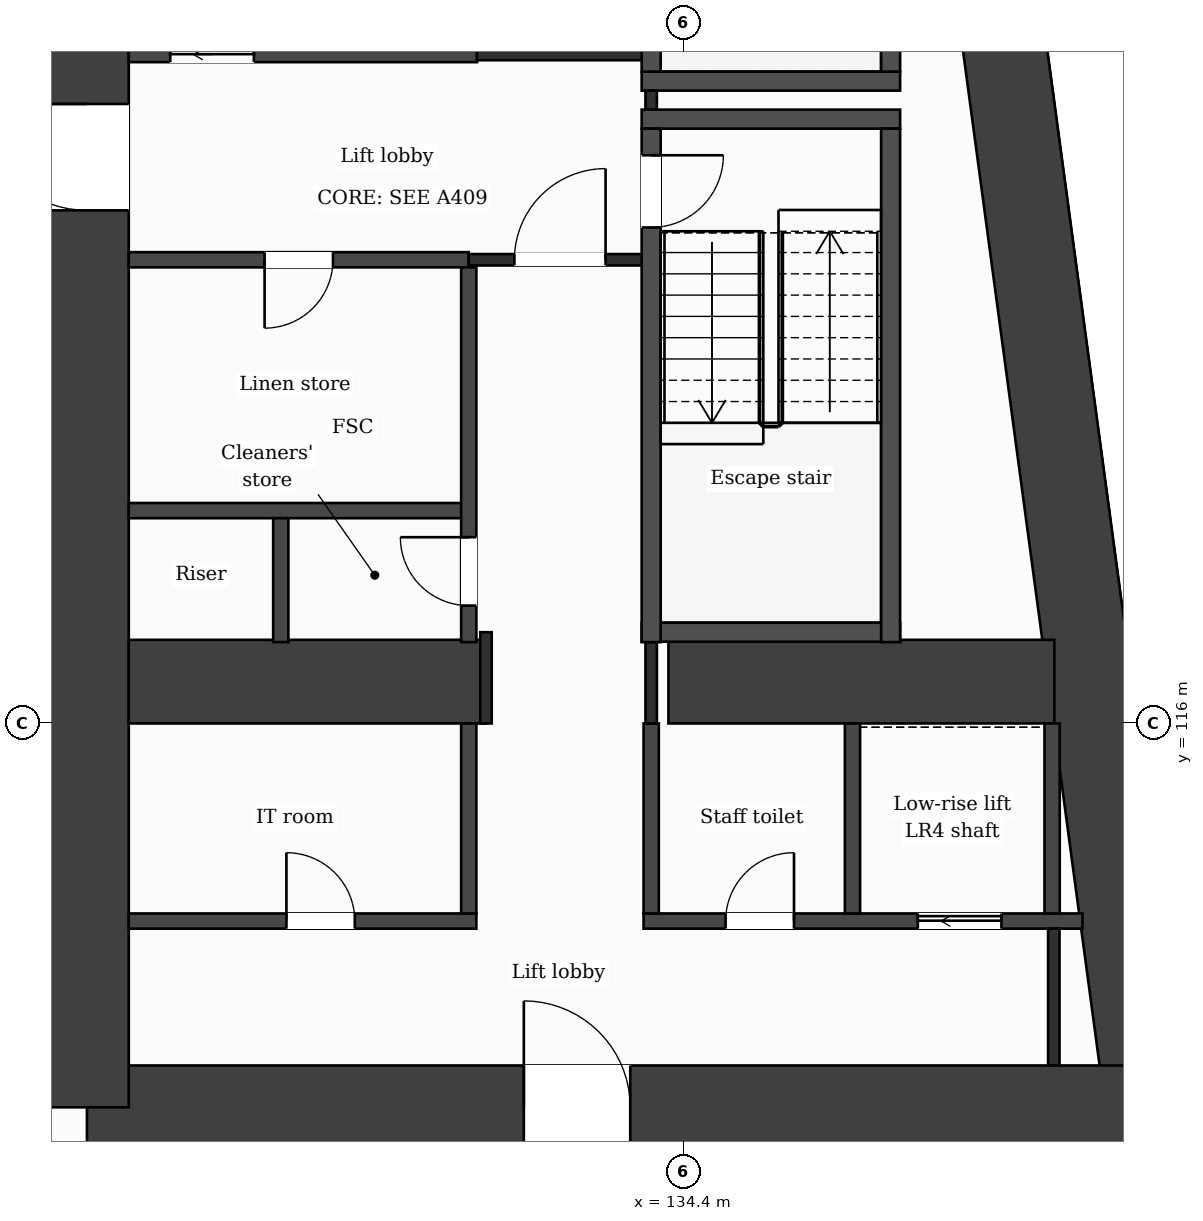
"""IFC4 building model, lengths in metres.
Left out: names, types, materials, properties, quantities, classifications, styles, units other than length and angle.
Written with IfcOpenShell. Run it as: python <this file> out.ifc"""

import sys

from ifc_helpers import new_model, si_unit, direction, frame, frame_2d, origin, place, context, subcontext, project, spatial, rectangle, extrude, element, fill, save


model = new_model("IFC4")
c1 = context("Model", 3, precision=1e-05, world=origin(), true_north=direction((0.0, 1.0)))
c2 = subcontext(c1, "Body", "Model", "MODEL_VIEW")
j1 = project(units=[si_unit("LENGTHUNIT", "METRE"), si_unit("PLANEANGLEUNIT", "RADIAN")], contexts=[c1])
p1 = place(None, origin())
s1 = spatial("IfcSite", under=j1, at=p1, CompositionType="ELEMENT")
p2 = place(p1, origin())
s2 = spatial("IfcBuilding", under=s1, at=p2, CompositionType="ELEMENT")
p3 = place(p2, frame((0.0, 0.0, 46.0)))
s3 = spatial("IfcBuildingStorey", under=s2, at=p3, CompositionType="ELEMENT", Elevation=46.0)
p4 = place(p3, frame((137.688, 131.85, 0.0), z_axis=(0.0, 0.0, 1.0), x_axis=(0.133411793472, -0.991060691059, 0.0)))
e1 = element("IfcWall", 1, at=p4, inside=s3, PredefinedType="SHEAR", context=c2, shape_type="SweptSolid", body=[
    extrude(rectangle(XDim=21.089, YDim=1.1, at=frame_2d((10.544, 0.0))), origin(), (0.0, 0.0, 1.0), 3.5),
])
p5 = place(p3, frame((140.502, 110.95, 0.0), z_axis=(0.0, 0.0, 1.0), x_axis=(-1.0, 0.0, 0.0)))
e2 = element("IfcWall", 2, at=p5, inside=s3, PredefinedType="SHEAR", context=c2, shape_type="SweptSolid", body=[
    extrude(rectangle(XDim=13.952, YDim=1.1, at=frame_2d((6.976, 0.0))), origin(), (0.0, 0.0, 1.0), 3.5),
])
p6 = place(p5, frame((6.804, 0.0, 0.0)))
e3 = element("IfcOpeningElement", 3, at=p6, cuts=e2, PredefinedType="OPENING", context=c2, shape_type="SweptSolid", body=[
    extrude(rectangle(XDim=1.4, YDim=2.1, at=frame_2d((0.7, 1.05))), frame((0.0, 0.56, 0.0), z_axis=(0.0, -1.0, 0.0), x_axis=(1.0, 0.0, 0.0)), (0.0, 0.0, 1.0), 1.12),
])
p7 = place(p3, frame((126.55, 110.95, 0.0), z_axis=(0.0, 0.0, 1.0), x_axis=(0.0, 1.0, 0.0)))
e4 = element("IfcWall", 4, at=p7, inside=s3, PredefinedType="SHEAR", context=c2, shape_type="SweptSolid", body=[
    extrude(rectangle(XDim=20.9, YDim=1.1, at=frame_2d((10.45, 0.0))), origin(), (0.0, 0.0, 1.0), 3.5),
])
p8 = place(p7, frame((11.8, 0.0, 0.0)))
e5 = element("IfcOpeningElement", 5, at=p8, cuts=e4, PredefinedType="OPENING", context=c2, shape_type="SweptSolid", body=[
    extrude(rectangle(XDim=1.4, YDim=2.1, at=frame_2d((0.7, 1.05))), frame((0.0, 0.56, 0.0), z_axis=(0.0, -1.0, 0.0), x_axis=(1.0, 0.0, 0.0)), (0.0, 0.0, 1.0), 1.12),
])
p9 = place(p3, frame((127.1, 116.55, 0.0), z_axis=(0.0, 0.0, 1.0), x_axis=(1.0, 0.0, 0.0)))
e6 = element("IfcWall", 6, at=p9, inside=s3, PredefinedType="SHEAR", context=c2, shape_type="SweptSolid", body=[
    extrude(rectangle(XDim=4.7, YDim=1.1, at=frame_2d((2.35, 0.0))), origin(), (0.0, 0.0, 1.0), 3.5),
])
p10 = place(p3, frame((134.2, 116.55, 0.0), z_axis=(0.0, 0.0, 1.0), x_axis=(1.0, 0.0, 0.0)))
e7 = element("IfcWall", 7, at=p10, inside=s3, PredefinedType="SHEAR", context=c2, shape_type="SweptSolid", body=[
    extrude(rectangle(XDim=5.077, YDim=1.1, at=frame_2d((2.539, 0.0))), origin(), (0.0, 0.0, 1.0), 3.5),
])
p11 = place(p3, frame((127.1, 113.4, 0.0), z_axis=(0.0, 0.0, 1.0), x_axis=(1.0, 0.0, 0.0)))
e8 = element("IfcWall", 8, at=p11, inside=s3, PredefinedType="PARTITIONING", context=c2, shape_type="SweptSolid", body=[
    extrude(rectangle(XDim=4.573, YDim=0.2, at=frame_2d((2.287, 0.0))), origin(), (0.0, 0.0, 1.0), 3.18),
])
p12 = place(p11, frame((2.074, 0.0, 0.0)))
e9 = element("IfcOpeningElement", 9, at=p12, cuts=e8, PredefinedType="OPENING", context=c2, shape_type="SweptSolid", body=[
    extrude(rectangle(XDim=0.9, YDim=2.1, at=frame_2d((0.45, 1.05))), frame((0.0, 0.11, 0.0), z_axis=(0.0, -1.0, 0.0), x_axis=(1.0, 0.0, 0.0)), (0.0, 0.0, 1.0), 0.22),
])
p13 = place(p3, frame((133.873, 113.4, 0.0), z_axis=(0.0, 0.0, 1.0), x_axis=(1.0, 0.0, 0.0)))
e10 = element("IfcWall", 10, at=p13, inside=s3, PredefinedType="PARTITIONING", context=c2, shape_type="SweptSolid", body=[
    extrude(rectangle(XDim=5.774, YDim=0.2, at=frame_2d((2.887, 0.0))), origin(), (0.0, 0.0, 1.0), 3.18),
])
p14 = place(p13, frame((3.608, 0.0, 0.0)))
e11 = element("IfcOpeningElement", 11, at=p14, cuts=e10, PredefinedType="OPENING", context=c2, shape_type="SweptSolid", body=[
    extrude(rectangle(XDim=1.1, YDim=2.1, at=frame_2d((0.55, 1.05))), frame((0.0, 0.11, 0.0), z_axis=(0.0, -1.0, 0.0), x_axis=(1.0, 0.0, 0.0)), (0.0, 0.0, 1.0), 0.22),
])
p15 = place(p13, frame((1.079, 0.0, 0.0)))
e12 = element("IfcOpeningElement", 12, at=p15, cuts=e10, PredefinedType="OPENING", context=c2, shape_type="SweptSolid", body=[
    extrude(rectangle(XDim=0.9, YDim=2.1, at=frame_2d((0.45, 1.05))), frame((0.0, 0.11, 0.0), z_axis=(0.0, -1.0, 0.0), x_axis=(1.0, 0.0, 0.0)), (0.0, 0.0, 1.0), 0.22),
])
p16 = place(p3, frame((133.848, 117.2, 0.0), z_axis=(0.0, 0.0, 1.0), x_axis=(1.0, 0.0, 0.0)))
e13 = element("IfcWall", 13, at=p16, inside=s3, PredefinedType="PARTITIONING", context=c2, shape_type="SweptSolid", body=[
    extrude(rectangle(XDim=3.4, YDim=0.25, at=frame_2d((1.7, 0.0))), origin(), (0.0, 0.0, 1.0), 3.18),
])
p17 = place(p3, frame((127.1, 118.8, 0.0), z_axis=(0.0, 0.0, 1.0), x_axis=(1.0, 0.0, 0.0)))
e14 = element("IfcWall", 14, at=p17, inside=s3, PredefinedType="PARTITIONING", context=c2, shape_type="SweptSolid", body=[
    extrude(rectangle(XDim=4.473, YDim=0.2, at=frame_2d((2.236, 0.0))), origin(), (0.0, 0.0, 1.0), 3.18),
])
p18 = place(p3, frame((127.1, 122.1, 0.0), z_axis=(0.0, 0.0, 1.0), x_axis=(1.0, 0.0, 0.0)))
e15 = element("IfcWall", 15, at=p18, inside=s3, PredefinedType="PARTITIONING", context=c2, shape_type="SweptSolid", body=[
    extrude(rectangle(XDim=4.473, YDim=0.2, at=frame_2d((2.236, 0.0))), origin(), (0.0, 0.0, 1.0), 3.18),
])
p19 = place(p18, frame((1.787, 0.0, 0.0)))
e16 = element("IfcOpeningElement", 16, at=p19, cuts=e15, PredefinedType="OPENING", context=c2, shape_type="SweptSolid", body=[
    extrude(rectangle(XDim=0.9, YDim=2.1, at=frame_2d((0.45, 1.05))), frame((0.0, 0.11, 0.0), z_axis=(0.0, -1.0, 0.0), x_axis=(1.0, 0.0, 0.0)), (0.0, 0.0, 1.0), 0.22),
])
p20 = place(p3, frame((131.573, 122.1, 0.0), z_axis=(0.0, 0.0, 1.0), x_axis=(1.0, 0.0, 0.0)))
e17 = element("IfcWall", 17, at=p20, inside=s3, PredefinedType="PARTITIONING", context=c2, shape_type="SweptSolid", body=[
    extrude(rectangle(XDim=2.4, YDim=0.15, at=frame_2d((1.2, 0.0))), origin(), (0.0, 0.0, 1.0), 3.18),
])
p21 = place(p20, frame((0.6, 0.0, 0.0)))
e18 = element("IfcOpeningElement", 18, at=p21, cuts=e17, PredefinedType="OPENING", context=c2, shape_type="SweptSolid", body=[
    extrude(rectangle(XDim=1.2, YDim=2.1, at=frame_2d((0.6, 1.05))), frame((0.0, 0.085, 0.0), z_axis=(0.0, -1.0, 0.0), x_axis=(1.0, 0.0, 0.0)), (0.0, 0.0, 1.0), 0.17),
])
for number, where, z_axis, x_axis in (
    (19, (133.848, 123.95, 0.0), (0.0, 0.0, 1.0), (1.0, 0.0, 0.0)),
    (20, (133.848, 124.45, 0.0), (0.0, 0.0, 1.0), (1.0, 0.0, 0.0)),
):
    element("IfcWall", number, at=place(p3, frame(where, z_axis=z_axis, x_axis=x_axis)), inside=s3, PredefinedType="PARTITIONING", context=c2, shape_type="SweptSolid", body=[
        extrude(rectangle(XDim=3.4, YDim=0.25, at=frame_2d((1.7, 0.0))), origin(), (0.0, 0.0, 1.0), 3.18),
    ])
p22 = place(p3, frame((127.1, 124.8, 0.0), z_axis=(0.0, 0.0, 1.0), x_axis=(1.0, 0.0, 0.0)))
e21 = element("IfcWall", 21, at=p22, inside=s3, PredefinedType="PARTITIONING", context=c2, shape_type="SweptSolid", body=[
    extrude(rectangle(XDim=4.582, YDim=0.2, at=frame_2d((2.291, 0.0))), origin(), (0.0, 0.0, 1.0), 3.18),
])
p23 = place(p22, frame((0.546, 0.0, 0.0)))
e22 = element("IfcOpeningElement", 22, at=p23, cuts=e21, PredefinedType="OPENING", context=c2, shape_type="SweptSolid", body=[
    extrude(rectangle(XDim=1.1, YDim=2.1, at=frame_2d((0.55, 1.05))), frame((0.0, 0.11, 0.0), z_axis=(0.0, -1.0, 0.0), x_axis=(1.0, 0.0, 0.0)), (0.0, 0.0, 1.0), 0.22),
])
p24 = place(p3, frame((131.682, 124.8, 0.0), z_axis=(0.0, 0.0, 1.0), x_axis=(1.0, 0.0, 0.0)))
e23 = element("IfcWall", 23, at=p24, inside=s3, PredefinedType="PARTITIONING", context=c2, shape_type="SweptSolid", body=[
    extrude(rectangle(XDim=2.416, YDim=0.15, at=frame_2d((1.208, 0.0))), origin(), (0.0, 0.0, 1.0), 3.18),
])
p25 = place(p3, frame((129.1, 117.07, 0.0), z_axis=(0.0, 0.0, 1.0), x_axis=(0.0, 1.0, 0.0)))
e24 = element("IfcWall", 24, at=p25, inside=s3, PredefinedType="PARTITIONING", context=c2, shape_type="SweptSolid", body=[
    extrude(rectangle(XDim=1.63, YDim=0.2, at=frame_2d((0.815, 0.0))), origin(), (0.0, 0.0, 1.0), 3.18),
])
p26 = place(p3, frame((131.573, 113.5, 0.0), z_axis=(0.0, 0.0, 1.0), x_axis=(0.0, 1.0, 0.0)))
e25 = element("IfcWall", 25, at=p26, inside=s3, PredefinedType="PARTITIONING", context=c2, shape_type="SweptSolid", body=[
    extrude(rectangle(XDim=2.5, YDim=0.2, at=frame_2d((1.25, 0.0))), origin(), (0.0, 0.0, 1.0), 3.18),
])
p27 = place(p3, frame((131.573, 117.07, 0.0), z_axis=(0.0, 0.0, 1.0), x_axis=(0.0, 1.0, 0.0)))
e26 = element("IfcWall", 26, at=p27, inside=s3, PredefinedType="PARTITIONING", context=c2, shape_type="SweptSolid", body=[
    extrude(rectangle(XDim=4.93, YDim=0.2, at=frame_2d((2.465, 0.0))), origin(), (0.0, 0.0, 1.0), 3.18),
])
p28 = place(p27, frame((0.48, 0.0, 0.0)))
e27 = element("IfcOpeningElement", 27, at=p28, cuts=e26, PredefinedType="OPENING", context=c2, shape_type="SweptSolid", body=[
    extrude(rectangle(XDim=0.9, YDim=2.1, at=frame_2d((0.45, 1.05))), frame((0.0, 0.11, 0.0), z_axis=(0.0, -1.0, 0.0), x_axis=(1.0, 0.0, 0.0)), (0.0, 0.0, 1.0), 0.22),
])
p29 = place(p3, frame((131.8, 116.0, 0.0), z_axis=(0.0, 0.0, 1.0), x_axis=(0.0, 1.0, 0.0)))
e28 = element("IfcWall", 28, at=p29, inside=s3, PredefinedType="PARTITIONING", context=c2, shape_type="SweptSolid", body=[
    extrude(rectangle(XDim=1.2, YDim=0.15, at=frame_2d((0.6, 0.0))), origin(), (0.0, 0.0, 1.0), 3.18),
])
p30 = place(p3, frame((133.973, 113.5, 0.0), z_axis=(0.0, 0.0, 1.0), x_axis=(0.0, 1.0, 0.0)))
e29 = element("IfcWall", 29, at=p30, inside=s3, PredefinedType="PARTITIONING", context=c2, shape_type="SweptSolid", body=[
    extrude(rectangle(XDim=2.5, YDim=0.2, at=frame_2d((1.25, 0.0))), origin(), (0.0, 0.0, 1.0), 3.18),
])
p31 = place(p3, frame((133.973, 116.0, 0.0), z_axis=(0.0, 0.0, 1.0), x_axis=(0.0, 1.0, 0.0)))
e30 = element("IfcWall", 30, at=p31, inside=s3, PredefinedType="PARTITIONING", context=c2, shape_type="SweptSolid", body=[
    extrude(rectangle(XDim=1.07, YDim=0.15, at=frame_2d((0.535, 0.0))), origin(), (0.0, 0.0, 1.0), 3.18),
])
p32 = place(p3, frame((133.973, 124.075, 0.0), z_axis=(0.0, 0.0, 1.0), x_axis=(0.0, 1.0, 0.0)))
e31 = element("IfcWall", 31, at=p32, inside=s3, PredefinedType="PARTITIONING", context=c2, shape_type="SweptSolid", body=[
    extrude(rectangle(XDim=0.25, YDim=0.15, at=frame_2d((0.125, 0.0))), origin(), (0.0, 0.0, 1.0), 3.18),
])
p33 = place(p3, frame((133.973, 117.07, 0.0), z_axis=(0.0, 0.0, 1.0), x_axis=(0.0, 1.0, 0.0)))
e32 = element("IfcWall", 32, at=p33, inside=s3, PredefinedType="PARTITIONING", context=c2, shape_type="SweptSolid", body=[
    extrude(rectangle(XDim=6.755, YDim=0.25, at=frame_2d((3.377, 0.0))), origin(), (0.0, 0.0, 1.0), 3.18),
])
p34 = place(p33, frame((5.455, 0.0, 0.0)))
e33 = element("IfcOpeningElement", 33, at=p34, cuts=e32, PredefinedType="OPENING", context=c2, shape_type="SweptSolid", body=[
    extrude(rectangle(XDim=0.95, YDim=2.1, at=frame_2d((0.475, 1.05))), frame((0.0, 0.135, 0.0), z_axis=(0.0, -1.0, 0.0), x_axis=(1.0, 0.0, 0.0)), (0.0, 0.0, 1.0), 0.27),
])
p35 = place(p3, frame((133.973, 124.575, 0.0), z_axis=(0.0, 0.0, 1.0), x_axis=(0.0, 1.0, 0.0)))
e34 = element("IfcWall", 34, at=p35, inside=s3, PredefinedType="PARTITIONING", context=c2, shape_type="SweptSolid", body=[
    extrude(rectangle(XDim=6.755, YDim=0.25, at=frame_2d((3.377, 0.0))), origin(), (0.0, 0.0, 1.0), 3.18),
])
p36 = place(p35, frame((5.325, 0.0, 0.0)))
e35 = element("IfcOpeningElement", 35, at=p36, cuts=e34, PredefinedType="OPENING", context=c2, shape_type="SweptSolid", body=[
    extrude(rectangle(XDim=1.0, YDim=2.1, at=frame_2d((0.5, 1.05))), frame((0.0, 0.135, 0.0), z_axis=(0.0, -1.0, 0.0), x_axis=(1.0, 0.0, 0.0)), (0.0, 0.0, 1.0), 0.27),
])
p37 = place(p3, frame((136.622, 113.5, 0.0), z_axis=(0.0, 0.0, 1.0), x_axis=(0.0, 1.0, 0.0)))
e36 = element("IfcWall", 36, at=p37, inside=s3, PredefinedType="PARTITIONING", context=c2, shape_type="SweptSolid", body=[
    extrude(rectangle(XDim=2.5, YDim=0.2, at=frame_2d((1.25, 0.0))), origin(), (0.0, 0.0, 1.0), 3.18),
])
p38 = place(p3, frame((137.123, 117.07, 0.0), z_axis=(0.0, 0.0, 1.0), x_axis=(0.0, 1.0, 0.0)))
e37 = element("IfcWall", 37, at=p38, inside=s3, PredefinedType="PARTITIONING", context=c2, shape_type="SweptSolid", body=[
    extrude(rectangle(XDim=6.755, YDim=0.25, at=frame_2d((3.377, 0.0))), origin(), (0.0, 0.0, 1.0), 3.18),
])
p39 = place(p3, frame((137.123, 124.575, 0.0), z_axis=(0.0, 0.0, 1.0), x_axis=(0.0, 1.0, 0.0)))
e38 = element("IfcWall", 38, at=p39, inside=s3, PredefinedType="PARTITIONING", context=c2, shape_type="SweptSolid", body=[
    extrude(rectangle(XDim=6.5, YDim=0.25, at=frame_2d((3.25, 0.0))), origin(), (0.0, 0.0, 1.0), 3.18),
])
p40 = place(p3, frame((139.248, 113.5, 0.0), z_axis=(0.0, 0.0, 1.0), x_axis=(0.0, 1.0, 0.0)))
e39 = element("IfcWall", 39, at=p40, inside=s3, PredefinedType="PARTITIONING", context=c2, shape_type="SweptSolid", body=[
    extrude(rectangle(XDim=2.5, YDim=0.2, at=frame_2d((1.25, 0.0))), origin(), (0.0, 0.0, 1.0), 3.18),
])
p41 = place(p3, frame((139.27, 111.5, 0.0), z_axis=(0.0, 0.0, 1.0), x_axis=(0.0, 1.0, 0.0)))
e40 = element("IfcWall", 40, at=p41, inside=s3, PredefinedType="PARTITIONING", context=c2, shape_type="SweptSolid", body=[
    extrude(rectangle(XDim=1.8, YDim=0.15, at=frame_2d((0.9, 0.0))), origin(), (0.0, 0.0, 1.0), 3.18),
])
p42 = place(p21, origin())
e41 = element("IfcDoor", 41, at=p42, inside=s3, OperationType="SINGLE_SWING_RIGHT", PredefinedType="DOOR", context=c2, shape_type="SweptSolid", body=[
    extrude(rectangle(XDim=1.2, YDim=2.1, at=frame_2d((0.6, 1.05))), frame((0.0, 0.025, 0.0), z_axis=(0.0, -1.0, 0.0), x_axis=(1.0, 0.0, 0.0)), (0.0, 0.0, 1.0), 0.05),
])
fill(e18, e41)
p43 = place(p23, origin())
e42 = element("IfcDoor", 42, at=p43, inside=s3, OperationType="SLIDING_TO_LEFT", PredefinedType="DOOR", context=c2, shape_type="SweptSolid", body=[
    extrude(rectangle(XDim=1.1, YDim=2.1, at=frame_2d((0.55, 1.05))), frame((0.0, 0.025, 0.0), z_axis=(0.0, -1.0, 0.0), x_axis=(1.0, 0.0, 0.0)), (0.0, 0.0, 1.0), 0.05),
])
fill(e22, e42)
p44 = place(p19, origin())
e43 = element("IfcDoor", 43, at=p44, inside=s3, OperationType="SINGLE_SWING_LEFT", PredefinedType="DOOR", context=c2, shape_type="SweptSolid", body=[
    extrude(rectangle(XDim=0.9, YDim=2.1, at=frame_2d((0.45, 1.05))), frame((0.0, 0.025, 0.0), z_axis=(0.0, -1.0, 0.0), x_axis=(1.0, 0.0, 0.0)), (0.0, 0.0, 1.0), 0.05),
])
fill(e16, e43)
p45 = place(p34, origin())
e44 = element("IfcDoor", 44, at=p45, inside=s3, OperationType="SINGLE_SWING_RIGHT", PredefinedType="DOOR", context=c2, shape_type="SweptSolid", body=[
    extrude(rectangle(XDim=0.95, YDim=2.1, at=frame_2d((0.475, 1.05))), frame((0.0, 0.025, 0.0), z_axis=(0.0, -1.0, 0.0), x_axis=(1.0, 0.0, 0.0)), (0.0, 0.0, 1.0), 0.05),
])
fill(e33, e44)
p46 = place(p28, origin())
e45 = element("IfcDoor", 45, at=p46, inside=s3, OperationType="SINGLE_SWING_RIGHT", PredefinedType="DOOR", context=c2, shape_type="SweptSolid", body=[
    extrude(rectangle(XDim=0.9, YDim=2.1, at=frame_2d((0.45, 1.05))), frame((0.0, 0.025, 0.0), z_axis=(0.0, -1.0, 0.0), x_axis=(1.0, 0.0, 0.0)), (0.0, 0.0, 1.0), 0.05),
])
fill(e27, e45)
p47 = place(p14, origin())
e46 = element("IfcDoor", 46, at=p47, inside=s3, OperationType="SLIDING_TO_LEFT", PredefinedType="DOOR", context=c2, shape_type="SweptSolid", body=[
    extrude(rectangle(XDim=1.1, YDim=2.1, at=frame_2d((0.55, 1.05))), frame((0.0, 0.025, 0.0), z_axis=(0.0, -1.0, 0.0), x_axis=(1.0, 0.0, 0.0)), (0.0, 0.0, 1.0), 0.05),
])
fill(e11, e46)
p48 = place(p15, origin())
e47 = element("IfcDoor", 47, at=p48, inside=s3, OperationType="SINGLE_SWING_RIGHT", PredefinedType="DOOR", context=c2, shape_type="SweptSolid", body=[
    extrude(rectangle(XDim=0.9, YDim=2.1, at=frame_2d((0.45, 1.05))), frame((0.0, 0.025, 0.0), z_axis=(0.0, -1.0, 0.0), x_axis=(1.0, 0.0, 0.0)), (0.0, 0.0, 1.0), 0.05),
])
fill(e12, e47)
p49 = place(p12, origin())
e48 = element("IfcDoor", 48, at=p49, inside=s3, OperationType="SINGLE_SWING_LEFT", PredefinedType="DOOR", context=c2, shape_type="SweptSolid", body=[
    extrude(rectangle(XDim=0.9, YDim=2.1, at=frame_2d((0.45, 1.05))), frame((0.0, 0.025, 0.0), z_axis=(0.0, -1.0, 0.0), x_axis=(1.0, 0.0, 0.0)), (0.0, 0.0, 1.0), 0.05),
])
fill(e9, e48)
p50 = place(p6, origin())
e49 = element("IfcDoor", 49, at=p50, inside=s3, OperationType="SINGLE_SWING_RIGHT", PredefinedType="DOOR", context=c2, shape_type="SweptSolid", body=[
    extrude(rectangle(XDim=1.4, YDim=2.1, at=frame_2d((0.7, 1.05))), frame((0.0, 0.025, 0.0), z_axis=(0.0, -1.0, 0.0), x_axis=(1.0, 0.0, 0.0)), (0.0, 0.0, 1.0), 0.05),
])
fill(e3, e49)
p51 = place(p8, origin())
e50 = element("IfcDoor", 50, at=p51, inside=s3, OperationType="SINGLE_SWING_RIGHT", PredefinedType="DOOR", context=c2, shape_type="SweptSolid", body=[
    extrude(rectangle(XDim=1.4, YDim=2.1, at=frame_2d((0.7, 1.05))), frame((0.0, 0.025, 0.0), z_axis=(0.0, -1.0, 0.0), x_axis=(1.0, 0.0, 0.0)), (0.0, 0.0, 1.0), 0.05),
])
fill(e5, e50)
save(model, sys.argv[1])
